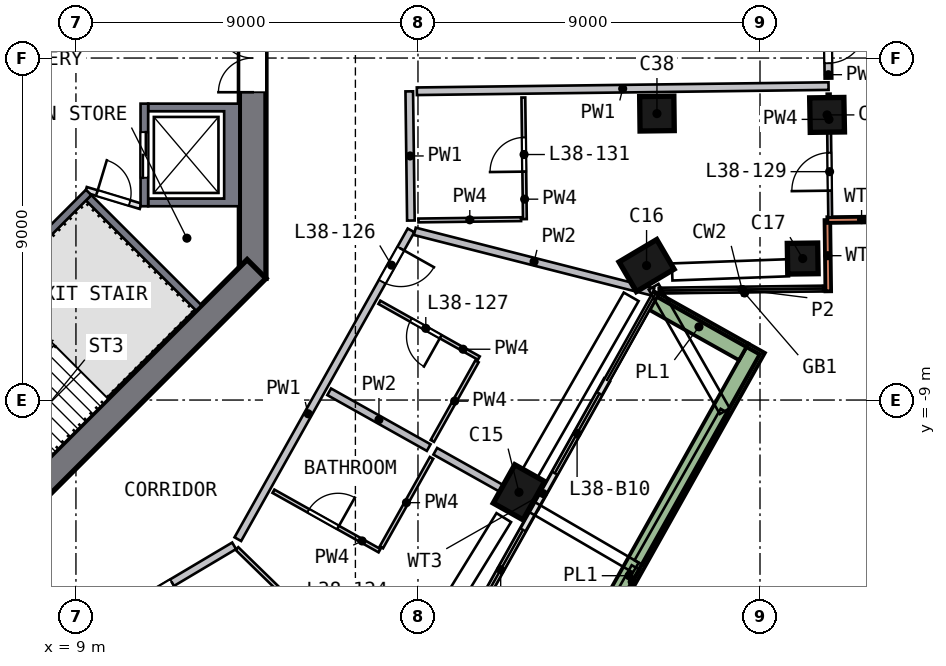
"""IFC4 building model, lengths in metres.
Left out: names, types, materials, properties, quantities, classifications, styles, units other than length and angle.
Written with IfcOpenShell. Run it as: python <this file> out.ifc"""

import sys

from ifc_helpers import new_model, si_unit, direction, frame, frame_2d, origin, origin_2d, place, context, subcontext, project, spatial, polyline, rectangle, outline, extrude, element, fill, save


model = new_model("IFC4")
c1 = context("Model", 3, precision=1e-05, world=origin(), true_north=direction((0.0, 1.0)))
c2 = subcontext(c1, "Body", "Model", "MODEL_VIEW")
j1 = project(units=[si_unit("LENGTHUNIT", "METRE"), si_unit("PLANEANGLEUNIT", "RADIAN")], contexts=[c1])
p1 = place(None, origin())
s1 = spatial("IfcSite", under=j1, at=p1, CompositionType="ELEMENT")
p2 = place(p1, origin())
s2 = spatial("IfcBuilding", under=s1, at=p2, CompositionType="ELEMENT")
p3 = place(p2, frame((0.0, 0.0, 158.5)))
s3 = spatial("IfcBuildingStorey", under=s2, at=p3, CompositionType="ELEMENT", Elevation=158.5)
p4 = place(p3, frame((20.592, -11.546, 0.0), z_axis=(0.054147738, 0.09840895, 0.993671828), x_axis=(0.486394176, 0.866490221, -0.112318307)))
e1 = element("IfcColumn", 1, at=p4, inside=s3, PredefinedType="COLUMN", context=c2, shape_type="SweptSolid", body=[
    extrude(rectangle(XDim=1.15, YDim=0.9, at=origin_2d()), origin(), (0.0, 0.0, 1.0), 3.21),
])
p5 = place(p3, frame((23.984, -5.599, 0.0), z_axis=(0.025690715, 0.114240071, 0.993120936), x_axis=(-0.860517755, -0.503078849, 0.080130301)))
e2 = element("IfcColumn", 2, at=p5, inside=s3, PredefinedType="COLUMN", context=c2, shape_type="SweptSolid", body=[
    extrude(rectangle(XDim=1.15, YDim=0.9, at=origin_2d()), origin(), (0.0, 0.0, 1.0), 3.212),
])
p6 = place(p3, frame((28.153, -5.437, 0.0), z_axis=(-0.02358596, 0.132415071, 0.990913695), x_axis=(0.999645385, 0.015379788, 0.021738604)))
e3 = element("IfcColumn", 3, at=p6, inside=s3, PredefinedType="COLUMN", context=c2, shape_type="SweptSolid", body=[
    extrude(rectangle(XDim=0.8, YDim=0.8, at=origin_2d()), origin(), (0.0, 0.0, 1.0), 3.219),
])
p7 = place(p3, frame((24.281, -1.602, 0.0), z_axis=(0.006613755, 0.115550662, 0.993279569), x_axis=(0.99989634, 0.011939788, -0.008046798)))
e4 = element("IfcColumn", 4, at=p7, inside=s3, PredefinedType="COLUMN", context=c2, shape_type="SweptSolid", body=[
    extrude(rectangle(XDim=0.9, YDim=0.9, at=origin_2d()), origin(), (0.0, 0.0, 1.0), 3.211),
])
p8 = place(p3, frame((28.815, -1.66, 0.0), z_axis=(-0.041519097, 0.135240125, 0.989942561), x_axis=(0.999058225, 0.018116888, 0.039426394)))
e5 = element("IfcColumn", 5, at=p8, inside=s3, PredefinedType="COLUMN", context=c2, shape_type="SweptSolid", body=[
    extrude(rectangle(XDim=0.9, YDim=0.9, at=origin_2d()), origin(), (0.0, 0.0, 1.0), 3.222),
])
p9 = place(p3, frame((13.65, -5.799, 0.0), z_axis=(0.0, 0.0, 1.0), x_axis=(0.0, 1.0, 0.0)))
e6 = element("IfcWall", 6, at=p9, inside=s3, PredefinedType="SHEAR", context=c2, shape_type="SweptSolid", body=[
    extrude(rectangle(XDim=11.598, YDim=0.7, at=frame_2d((5.799, 0.0))), origin(), (0.0, 0.0, 1.0), 3.5),
])
p10 = place(p9, frame((4.899, 0.0, 0.0)))
e7 = element("IfcOpeningElement", 7, at=p10, cuts=e6, PredefinedType="OPENING", context=c2, shape_type="SweptSolid", body=[
    extrude(rectangle(XDim=1.8, YDim=2.1, at=frame_2d((0.9, 1.05))), frame((0.0, 0.36, 0.0), z_axis=(0.0, -1.0, 0.0), x_axis=(1.0, 0.0, 0.0)), (0.0, 0.0, 1.0), 0.72),
])
p11 = place(p3, frame((5.552, -13.752, 0.0), z_axis=(0.0, 0.0, 1.0), x_axis=(0.707106781, 0.707106781, 0.0)))
e8 = element("IfcWall", 8, at=p11, inside=s3, PredefinedType="SHEAR", context=c2, shape_type="SweptSolid", body=[
    extrude(rectangle(XDim=11.598, YDim=0.7, at=frame_2d((5.799, 0.0))), origin(), (0.0, 0.0, 1.0), 3.5),
])
p12 = place(p11, frame((2.099, 0.0, 0.0)))
e9 = element("IfcOpeningElement", 9, at=p12, cuts=e8, PredefinedType="OPENING", context=c2, shape_type="SweptSolid", body=[
    extrude(rectangle(XDim=1.2, YDim=2.1, at=frame_2d((0.6, 1.05))), frame((0.0, 0.36, 0.0), z_axis=(0.0, -1.0, 0.0), x_axis=(1.0, 0.0, 0.0)), (0.0, 0.0, 1.0), 0.72),
])
p13 = place(p3, frame((28.796, -6.139, 0.0), z_axis=(0.0, 0.0, 1.0), x_axis=(-0.012499024, 0.999921884, 0.0)))
e10 = element("IfcWall", 10, at=p13, inside=s3, PredefinedType="SOLIDWALL", context=c2, shape_type="SweptSolid", body=[
    extrude(rectangle(XDim=1.875, YDim=0.15, at=frame_2d((0.938, 0.0))), origin(), (0.0, 0.0, 1.0), 3.19),
])
p14 = place(p3, frame((28.773, -4.264, 0.0), z_axis=(0.0, 0.0, 1.0), x_axis=(0.999922138, 0.012478681, 0.0)))
e11 = element("IfcWall", 11, at=p14, inside=s3, PredefinedType="SOLIDWALL", context=c2, shape_type="SweptSolid", body=[
    extrude(rectangle(XDim=1.8, YDim=0.15, at=frame_2d((0.9, 0.0))), origin(), (0.0, 0.0, 1.0), 3.19),
])
p15 = place(p3, frame((19.394, -14.859, 0.0), z_axis=(0.0, 0.0, 1.0), x_axis=(0.489116721, 0.872218341, 0.0)))
e12 = element("IfcWall", 12, at=p15, inside=s3, PredefinedType="SOLIDWALL", context=c2, shape_type="SweptSolid", body=[
    extrude(rectangle(XDim=3.475, YDim=0.15, at=frame_2d((1.738, 0.0))), origin(), (0.0, 0.0, 1.0), 2.475),
])
p16 = place(p15, frame((0.4, 0.0, 0.0)))
e13 = element("IfcOpeningElement", 13, at=p16, cuts=e12, PredefinedType="OPENING", context=c2, shape_type="SweptSolid", body=[
    extrude(rectangle(XDim=2.4, YDim=2.4, at=frame_2d((1.2, 1.2))), frame((0.0, 0.085, 0.0), z_axis=(0.0, -1.0, 0.0), x_axis=(1.0, 0.0, 0.0)), (0.0, 0.0, 1.0), 0.17),
])
p17 = place(p3, frame((21.094, -11.828, 0.0), z_axis=(0.0, 0.0, 1.0), x_axis=(0.489027778, 0.872268211, 0.0)))
e14 = element("IfcWall", 14, at=p17, inside=s3, PredefinedType="SOLIDWALL", context=c2, shape_type="SweptSolid", body=[
    extrude(rectangle(XDim=3.836, YDim=0.15, at=frame_2d((1.918, 0.0))), origin(), (0.0, 0.0, 1.0), 2.475),
])
p18 = place(p17, frame((1.035, 0.0, 0.0)))
e15 = element("IfcOpeningElement", 15, at=p18, cuts=e14, PredefinedType="OPENING", context=c2, shape_type="SweptSolid", body=[
    extrude(rectangle(XDim=2.4, YDim=2.4, at=frame_2d((1.2, 1.2))), frame((0.0, 0.085, 0.0), z_axis=(0.0, -1.0, 0.0), x_axis=(1.0, 0.0, 0.0)), (0.0, 0.0, 1.0), 0.17),
])
p19 = place(p3, frame((20.199, -19.608, 0.0), z_axis=(0.0, 0.0, 1.0), x_axis=(0.48906647, 0.872246518, 0.0)))
e16 = element("IfcWall", 16, at=p19, inside=s3, PredefinedType="SOLIDWALL", context=c2, shape_type="SweptSolid", body=[
    extrude(rectangle(XDim=13.723, YDim=0.5, at=frame_2d((6.862, 0.0))), origin(), (0.0, 0.0, 1.0), 0.7),
])
p20 = place(p3, frame((26.571, -7.733, 0.0), z_axis=(0.0, 0.0, 1.0), x_axis=(-0.872217405, 0.489118389, 0.0)))
e17 = element("IfcWall", 17, at=p20, inside=s3, PredefinedType="SOLIDWALL", context=c2, shape_type="SweptSolid", body=[
    extrude(rectangle(XDim=2.699, YDim=0.5, at=frame_2d((1.35, 0.0))), origin(), (0.0, 0.0, 1.0), 0.7),
])
p21 = place(p3, origin())
e18 = element("IfcWall", 18, at=p21, inside=s3, PredefinedType="SOLIDWALL", context=c2, shape_type="SweptSolid", body=[
    extrude(outline(polyline([(13.3, -3.9), (10.9, -3.9), (10.9, -3.7), (12.9, -3.7), (12.9, -1.4), (10.9, -1.4), (10.9, -1.2), (13.3, -1.2), (13.3, -3.9)])), origin(), (0.0, 0.0, 1.0), 3.19),
])
p22 = place(p3, frame((10.8, -1.2, 0.0), z_axis=(0.0, 0.0, 1.0), x_axis=(0.0, -1.0, 0.0)))
e19 = element("IfcWall", 19, at=p22, inside=s3, PredefinedType="SOLIDWALL", context=c2, shape_type="SweptSolid", body=[
    extrude(rectangle(XDim=2.7, YDim=0.2, at=frame_2d((1.35, 0.0))), origin(), (0.0, 0.0, 1.0), 3.19),
])
p23 = place(p22, frame((0.75, 0.0, 0.0)))
e20 = element("IfcOpeningElement", 20, at=p23, cuts=e19, PredefinedType="OPENING", context=c2, shape_type="SweptSolid", body=[
    extrude(rectangle(XDim=1.2, YDim=2.1, at=frame_2d((0.6, 1.05))), frame((0.0, 0.11, 0.0), z_axis=(0.0, -1.0, 0.0), x_axis=(1.0, 0.0, 0.0)), (0.0, 0.0, 1.0), 0.22),
])
p24 = place(p3, frame((9.334, -3.535, 0.0), z_axis=(0.0, 0.0, 1.0), x_axis=(-0.707106781, -0.707106781, 0.0)))
e21 = element("IfcWall", 21, at=p24, inside=s3, PredefinedType="SOLIDWALL", context=c2, shape_type="SweptSolid", body=[
    extrude(rectangle(XDim=8.2, YDim=0.2, at=frame_2d((4.1, 0.0))), origin(), (0.0, 0.0, 1.0), 3.19),
])
p25 = place(p24, frame((6.6, 0.0, 0.0)))
e22 = element("IfcOpeningElement", 22, at=p25, cuts=e21, PredefinedType="OPENING", context=c2, shape_type="SweptSolid", body=[
    extrude(rectangle(XDim=1.2, YDim=2.1, at=frame_2d((0.6, 1.05))), frame((0.0, 0.11, 0.0), z_axis=(0.0, -1.0, 0.0), x_axis=(1.0, 0.0, 0.0)), (0.0, 0.0, 1.0), 0.22),
])
p26 = place(p3, frame((9.334, -3.677, 0.0), z_axis=(0.0, 0.0, 1.0), x_axis=(0.707106781, -0.707106781, 0.0)))
e23 = element("IfcWall", 23, at=p26, inside=s3, PredefinedType="SOLIDWALL", context=c2, shape_type="SweptSolid", body=[
    extrude(rectangle(XDim=4.1, YDim=0.2, at=frame_2d((2.05, 0.0))), origin(), (0.0, 0.0, 1.0), 3.19),
])
p27 = place(p3, frame((9.263, -3.465, 0.0), z_axis=(0.0, 0.0, 1.0), x_axis=(0.957084567, -0.289808785, 0.0)))
e24 = element("IfcWall", 24, at=p27, inside=s3, PredefinedType="PARTITIONING", context=c2, shape_type="SweptSolid", body=[
    extrude(rectangle(XDim=1.501, YDim=0.15, at=frame_2d((0.75, 0.0))), origin(), (0.0, 0.0, 1.0), 3.19),
])
p28 = place(p27, frame((0.301, 0.0, 0.0)))
e25 = element("IfcOpeningElement", 25, at=p28, cuts=e24, PredefinedType="OPENING", context=c2, shape_type="SweptSolid", body=[
    extrude(rectangle(XDim=0.9, YDim=2.1, at=frame_2d((0.45, 1.05))), frame((0.0, 0.085, 0.0), z_axis=(0.0, -1.0, 0.0), x_axis=(1.0, 0.0, 0.0)), (0.0, 0.0, 1.0), 0.17),
])
p29 = place(p3, frame((13.162, -12.836, 0.0), z_axis=(0.0, 0.0, 1.0), x_axis=(-0.859674935, -0.510841468, 0.0)))
e26 = element("IfcWall", 26, at=p29, inside=s3, PredefinedType="SOLIDWALL", context=c2, shape_type="SweptSolid", body=[
    extrude(rectangle(XDim=9.316, YDim=0.2, at=frame_2d((4.658, 0.0))), origin(), (0.0, 0.0, 1.0), 3.19),
])
p30 = place(p29, frame((1.9, 0.0, 0.0)))
e27 = element("IfcOpeningElement", 27, at=p30, cuts=e26, PredefinedType="OPENING", context=c2, shape_type="SweptSolid", body=[
    extrude(rectangle(XDim=1.0, YDim=2.1, at=frame_2d((0.5, 1.05))), frame((0.0, 0.11, 0.0), z_axis=(0.0, -1.0, 0.0), x_axis=(1.0, 0.0, 0.0)), (0.0, 0.0, 1.0), 0.22),
])
p31 = place(p3, frame((17.817, -4.535, 0.0), z_axis=(0.0, 0.0, 1.0), x_axis=(-0.489090048, -0.872233297, 0.0)))
e28 = element("IfcWall", 28, at=p31, inside=s3, PredefinedType="SOLIDWALL", context=c2, shape_type="SweptSolid", body=[
    extrude(rectangle(XDim=9.317, YDim=0.2, at=frame_2d((4.658, 0.0))), origin(), (0.0, 0.0, 1.0), 3.19),
])
p32 = place(p31, frame((0.55, 0.0, 0.0)))
e29 = element("IfcOpeningElement", 29, at=p32, cuts=e28, PredefinedType="OPENING", context=c2, shape_type="SweptSolid", body=[
    extrude(rectangle(XDim=1.0, YDim=2.1, at=frame_2d((0.5, 1.05))), frame((0.0, 0.11, 0.0), z_axis=(0.0, -1.0, 0.0), x_axis=(1.0, 0.0, 0.0)), (0.0, 0.0, 1.0), 0.22),
])
p33 = place(p3, frame((17.813, -4.277, 0.0), z_axis=(0.0, 0.0, 1.0), x_axis=(-0.01256543, 0.999921052, 0.0)))
e30 = element("IfcWall", 30, at=p33, inside=s3, PredefinedType="SOLIDWALL", context=c2, shape_type="SweptSolid", body=[
    extrude(rectangle(XDim=3.4, YDim=0.2, at=frame_2d((1.7, 0.0))), origin(), (0.0, 0.0, 1.0), 3.19),
])
p34 = place(p3, frame((17.971, -0.874, 0.0), z_axis=(0.0, 0.0, 1.0), x_axis=(0.999920934, 0.012574787, 0.0)))
e31 = element("IfcWall", 31, at=p34, inside=s3, PredefinedType="SOLIDWALL", context=c2, shape_type="SweptSolid", body=[
    extrude(rectangle(XDim=10.834, YDim=0.2, at=frame_2d((5.417, 0.0))), origin(), (0.0, 0.0, 1.0), 3.19),
])
p35 = place(p3, frame((28.778, 1.264, 0.0), z_axis=(0.0, 0.0, 1.0), x_axis=(0.012586983, -0.999920781, 0.0)))
e32 = element("IfcWall", 32, at=p35, inside=s3, PredefinedType="SOLIDWALL", context=c2, shape_type="SweptSolid", body=[
    extrude(rectangle(XDim=1.804, YDim=0.2, at=frame_2d((0.902, 0.0))), origin(), (0.0, 0.0, 1.0), 3.19),
])
p36 = place(p35, frame((0.4, 0.0, 0.0)))
e33 = element("IfcOpeningElement", 33, at=p36, cuts=e32, PredefinedType="OPENING", context=c2, shape_type="SweptSolid", body=[
    extrude(rectangle(XDim=1.0, YDim=2.1, at=frame_2d((0.5, 1.05))), frame((0.0, 0.11, 0.0), z_axis=(0.0, -1.0, 0.0), x_axis=(1.0, 0.0, 0.0)), (0.0, 0.0, 1.0), 0.22),
])
p37 = place(p3, frame((15.664, -8.783, 0.0), z_axis=(0.0, 0.0, 1.0), x_axis=(0.872228513, -0.489098581, 0.0)))
e34 = element("IfcWall", 34, at=p37, inside=s3, PredefinedType="SOLIDWALL", context=c2, shape_type="SweptSolid", body=[
    extrude(rectangle(XDim=3.002, YDim=0.2, at=frame_2d((1.501, 0.0))), origin(), (0.0, 0.0, 1.0), 3.19),
])
p38 = place(p3, frame((18.455, -10.348, 0.0), z_axis=(0.0, 0.0, 1.0), x_axis=(0.872237762, -0.489082085, 0.0)))
e35 = element("IfcWall", 35, at=p38, inside=s3, PredefinedType="SOLIDWALL", context=c2, shape_type="SweptSolid", body=[
    extrude(rectangle(XDim=2.95, YDim=0.2, at=frame_2d((1.475, 0.0))), origin(), (0.0, 0.0, 1.0), 3.19),
])
p39 = place(p3, frame((17.917, -4.56, 0.0), z_axis=(0.0, 0.0, 1.0), x_axis=(0.969097993, -0.246676062, 0.0)))
e36 = element("IfcWall", 36, at=p39, inside=s3, PredefinedType="SOLIDWALL", context=c2, shape_type="SweptSolid", body=[
    extrude(rectangle(XDim=6.476, YDim=0.2, at=frame_2d((3.238, 0.0))), origin(), (0.0, 0.0, 1.0), 3.19),
])
p40 = place(p3, frame((13.237, -12.908, 0.0), z_axis=(0.0, 0.0, 1.0), x_axis=(0.71592947, -0.69817261, 0.0)))
e37 = element("IfcWall", 37, at=p40, inside=s3, PredefinedType="PARTITIONING", context=c2, shape_type="SweptSolid", body=[
    extrude(rectangle(XDim=6.476, YDim=0.1, at=frame_2d((3.238, 0.0))), origin(), (0.0, 0.0, 1.0), 2.69),
])
p41 = place(p40, frame((3.55, 0.0, 0.0)))
e38 = element("IfcOpeningElement", 38, at=p41, cuts=e37, PredefinedType="OPENING", context=c2, shape_type="SweptSolid", body=[
    extrude(rectangle(XDim=1.0, YDim=2.1, at=frame_2d((0.5, 1.05))), frame((0.0, 0.06, 0.0), z_axis=(0.0, -1.0, 0.0), x_axis=(1.0, 0.0, 0.0)), (0.0, 0.0, 1.0), 0.12),
])
p42 = place(p3, frame((14.197, -11.4, 0.0), z_axis=(0.0, 0.0, 1.0), x_axis=(0.872210525, -0.489130657, 0.0)))
e39 = element("IfcWall", 39, at=p42, inside=s3, PredefinedType="PARTITIONING", context=c2, shape_type="SweptSolid", body=[
    extrude(rectangle(XDim=3.2, YDim=0.1, at=frame_2d((1.6, 0.0))), origin(), (0.0, 0.0, 1.0), 3.19),
])
p43 = place(p42, frame((1.05, 0.0, 0.0)))
e40 = element("IfcOpeningElement", 40, at=p43, cuts=e39, PredefinedType="OPENING", context=c2, shape_type="SweptSolid", body=[
    extrude(rectangle(XDim=0.9, YDim=2.1, at=frame_2d((0.45, 1.05))), frame((0.0, 0.06, 0.0), z_axis=(0.0, -1.0, 0.0), x_axis=(1.0, 0.0, 0.0)), (0.0, 0.0, 1.0), 0.12),
])
p44 = place(p3, frame((17.037, -12.878, 0.0), z_axis=(0.0, 0.0, 1.0), x_axis=(0.489063093, 0.872248411, 0.0)))
e41 = element("IfcWall", 41, at=p44, inside=s3, PredefinedType="PARTITIONING", context=c2, shape_type="SweptSolid", body=[
    extrude(rectangle(XDim=2.7, YDim=0.1, at=frame_2d((1.35, 0.0))), origin(), (0.0, 0.0, 1.0), 3.19),
])
p45 = place(p3, frame((19.601, -7.895, 0.0), z_axis=(0.0, 0.0, 1.0), x_axis=(-0.872231109, 0.489093951, 0.0)))
e42 = element("IfcWall", 42, at=p45, inside=s3, PredefinedType="PARTITIONING", context=c2, shape_type="SweptSolid", body=[
    extrude(rectangle(XDim=3.0, YDim=0.1, at=frame_2d((1.5, 0.0))), origin(), (0.0, 0.0, 1.0), 3.19),
])
p46 = place(p45, frame((1.15, 0.0, 0.0)))
e43 = element("IfcOpeningElement", 43, at=p46, cuts=e42, PredefinedType="OPENING", context=c2, shape_type="SweptSolid", body=[
    extrude(rectangle(XDim=0.9, YDim=2.1, at=frame_2d((0.45, 1.05))), frame((0.0, 0.06, 0.0), z_axis=(0.0, -1.0, 0.0), x_axis=(1.0, 0.0, 0.0)), (0.0, 0.0, 1.0), 0.12),
])
p47 = place(p3, frame((19.552, -7.982, 0.0), z_axis=(0.0, 0.0, 1.0), x_axis=(-0.48911131, -0.872221375, 0.0)))
e44 = element("IfcWall", 44, at=p47, inside=s3, PredefinedType="PARTITIONING", context=c2, shape_type="SweptSolid", body=[
    extrude(rectangle(XDim=2.4, YDim=0.1, at=frame_2d((1.2, 0.0))), origin(), (0.0, 0.0, 1.0), 3.19),
])
p48 = place(p3, frame((18.013, -4.274, 0.0), z_axis=(0.0, 0.0, 1.0), x_axis=(0.999921006, 0.012569092, 0.0)))
e45 = element("IfcWall", 45, at=p48, inside=s3, PredefinedType="PARTITIONING", context=c2, shape_type="SweptSolid", body=[
    extrude(rectangle(XDim=2.7, YDim=0.1, at=frame_2d((1.35, 0.0))), origin(), (0.0, 0.0, 1.0), 3.19),
])
p49 = place(p3, frame((20.813, -4.239, 0.0), z_axis=(0.0, 0.0, 1.0), x_axis=(-0.012588656, 0.99992076, 0.0)))
e46 = element("IfcWall", 46, at=p49, inside=s3, PredefinedType="PARTITIONING", context=c2, shape_type="SweptSolid", body=[
    extrude(rectangle(XDim=3.2, YDim=0.1, at=frame_2d((1.6, 0.0))), origin(), (0.0, 0.0, 1.0), 3.19),
])
p50 = place(p49, frame((1.25, 0.0, 0.0)))
e47 = element("IfcOpeningElement", 47, at=p50, cuts=e46, PredefinedType="OPENING", context=c2, shape_type="SweptSolid", body=[
    extrude(rectangle(XDim=0.9, YDim=2.1, at=frame_2d((0.45, 1.05))), frame((0.0, 0.06, 0.0), z_axis=(0.0, -1.0, 0.0), x_axis=(1.0, 0.0, 0.0)), (0.0, 0.0, 1.0), 0.12),
])
p51 = place(p3, frame((28.847, -4.19, 0.0), z_axis=(0.0, 0.0, 1.0), x_axis=(-0.012537493, 0.999921403, 0.0)))
e48 = element("IfcWall", 48, at=p51, inside=s3, PredefinedType="PARTITIONING", context=c2, shape_type="SweptSolid", body=[
    extrude(rectangle(XDim=3.252, YDim=0.1, at=frame_2d((1.626, 0.0))), origin(), (0.0, 0.0, 1.0), 3.19),
])
p52 = place(p51, frame((0.7, 0.0, 0.0)))
e49 = element("IfcOpeningElement", 49, at=p52, cuts=e48, PredefinedType="OPENING", context=c2, shape_type="SweptSolid", body=[
    extrude(rectangle(XDim=1.0, YDim=2.1, at=frame_2d((0.5, 1.05))), frame((0.0, 0.06, 0.0), z_axis=(0.0, -1.0, 0.0), x_axis=(1.0, 0.0, 0.0)), (0.0, 0.0, 1.0), 0.12),
])
p53 = place(p16, origin())
e50 = element("IfcDoor", 50, at=p53, inside=s3, OperationType="SLIDING_TO_RIGHT", PredefinedType="DOOR", context=c2, shape_type="SweptSolid", body=[
    extrude(rectangle(XDim=2.4, YDim=2.4, at=frame_2d((1.2, 1.2))), frame((0.0, 0.025, 0.0), z_axis=(0.0, -1.0, 0.0), x_axis=(1.0, 0.0, 0.0)), (0.0, 0.0, 1.0), 0.05),
])
fill(e13, e50)
p54 = place(p18, origin())
e51 = element("IfcDoor", 51, at=p54, inside=s3, OperationType="SLIDING_TO_LEFT", PredefinedType="DOOR", context=c2, shape_type="SweptSolid", body=[
    extrude(rectangle(XDim=2.4, YDim=2.4, at=frame_2d((1.2, 1.2))), frame((0.0, 0.025, 0.0), z_axis=(0.0, -1.0, 0.0), x_axis=(1.0, 0.0, 0.0)), (0.0, 0.0, 1.0), 0.05),
])
fill(e15, e51)
p55 = place(p23, origin())
e52 = element("IfcDoor", 52, at=p55, inside=s3, OperationType="DOUBLE_DOOR_SLIDING", PredefinedType="DOOR", context=c2, shape_type="SweptSolid", body=[
    extrude(rectangle(XDim=1.2, YDim=2.1, at=frame_2d((0.6, 1.05))), frame((0.0, 0.025, 0.0), z_axis=(0.0, -1.0, 0.0), x_axis=(1.0, 0.0, 0.0)), (0.0, 0.0, 1.0), 0.05),
])
fill(e20, e52)
p56 = place(p10, origin())
e53 = element("IfcDoor", 53, at=p56, inside=s3, OperationType="DOUBLE_DOOR_SINGLE_SWING", PredefinedType="DOOR", context=c2, shape_type="SweptSolid", body=[
    extrude(rectangle(XDim=1.8, YDim=2.1, at=frame_2d((0.9, 1.05))), frame((0.0, 0.025, 0.0), z_axis=(0.0, -1.0, 0.0), x_axis=(1.0, 0.0, 0.0)), (0.0, 0.0, 1.0), 0.05),
])
fill(e7, e53)
p57 = place(p28, origin())
e54 = element("IfcDoor", 54, at=p57, inside=s3, OperationType="SINGLE_SWING_LEFT", PredefinedType="DOOR", context=c2, shape_type="SweptSolid", body=[
    extrude(rectangle(XDim=0.9, YDim=2.1, at=frame_2d((0.45, 1.05))), frame((0.0, 0.025, 0.0), z_axis=(0.0, -1.0, 0.0), x_axis=(1.0, 0.0, 0.0)), (0.0, 0.0, 1.0), 0.05),
])
fill(e25, e54)
p58 = place(p30, origin())
e55 = element("IfcDoor", 55, at=p58, inside=s3, OperationType="SINGLE_SWING_LEFT", PredefinedType="DOOR", context=c2, shape_type="SweptSolid", body=[
    extrude(rectangle(XDim=1.0, YDim=2.1, at=frame_2d((0.5, 1.05))), frame((0.0, 0.025, 0.0), z_axis=(0.0, -1.0, 0.0), x_axis=(1.0, 0.0, 0.0)), (0.0, 0.0, 1.0), 0.05),
])
fill(e27, e55)
p59 = place(p43, origin())
e56 = element("IfcDoor", 56, at=p59, inside=s3, OperationType="SINGLE_SWING_RIGHT", PredefinedType="DOOR", context=c2, shape_type="SweptSolid", body=[
    extrude(rectangle(XDim=0.9, YDim=2.1, at=frame_2d((0.45, 1.05))), frame((0.0, 0.025, 0.0), z_axis=(0.0, -1.0, 0.0), x_axis=(1.0, 0.0, 0.0)), (0.0, 0.0, 1.0), 0.05),
])
fill(e40, e56)
p60 = place(p32, origin())
e57 = element("IfcDoor", 57, at=p60, inside=s3, OperationType="SINGLE_SWING_LEFT", PredefinedType="DOOR", context=c2, shape_type="SweptSolid", body=[
    extrude(rectangle(XDim=1.0, YDim=2.1, at=frame_2d((0.5, 1.05))), frame((0.0, 0.025, 0.0), z_axis=(0.0, -1.0, 0.0), x_axis=(1.0, 0.0, 0.0)), (0.0, 0.0, 1.0), 0.05),
])
fill(e29, e57)
p61 = place(p46, origin())
e58 = element("IfcDoor", 58, at=p61, inside=s3, OperationType="SINGLE_SWING_LEFT", PredefinedType="DOOR", context=c2, shape_type="SweptSolid", body=[
    extrude(rectangle(XDim=0.9, YDim=2.1, at=frame_2d((0.45, 1.05))), frame((0.0, 0.025, 0.0), z_axis=(0.0, -1.0, 0.0), x_axis=(1.0, 0.0, 0.0)), (0.0, 0.0, 1.0), 0.05),
])
fill(e43, e58)
p62 = place(p36, origin())
e59 = element("IfcDoor", 59, at=p62, inside=s3, OperationType="SINGLE_SWING_LEFT", PredefinedType="DOOR", context=c2, shape_type="SweptSolid", body=[
    extrude(rectangle(XDim=1.0, YDim=2.1, at=frame_2d((0.5, 1.05))), frame((0.0, 0.025, 0.0), z_axis=(0.0, -1.0, 0.0), x_axis=(1.0, 0.0, 0.0)), (0.0, 0.0, 1.0), 0.05),
])
fill(e33, e59)
p63 = place(p52, origin())
e60 = element("IfcDoor", 60, at=p63, inside=s3, OperationType="SINGLE_SWING_LEFT", PredefinedType="DOOR", context=c2, shape_type="SweptSolid", body=[
    extrude(rectangle(XDim=1.0, YDim=2.1, at=frame_2d((0.5, 1.05))), frame((0.0, 0.025, 0.0), z_axis=(0.0, -1.0, 0.0), x_axis=(1.0, 0.0, 0.0)), (0.0, 0.0, 1.0), 0.05),
])
fill(e49, e60)
p64 = place(p50, origin())
e61 = element("IfcDoor", 61, at=p64, inside=s3, OperationType="SINGLE_SWING_LEFT", PredefinedType="DOOR", context=c2, shape_type="SweptSolid", body=[
    extrude(rectangle(XDim=0.9, YDim=2.1, at=frame_2d((0.45, 1.05))), frame((0.0, 0.025, 0.0), z_axis=(0.0, -1.0, 0.0), x_axis=(1.0, 0.0, 0.0)), (0.0, 0.0, 1.0), 0.05),
])
fill(e47, e61)
save(model, sys.argv[1])
